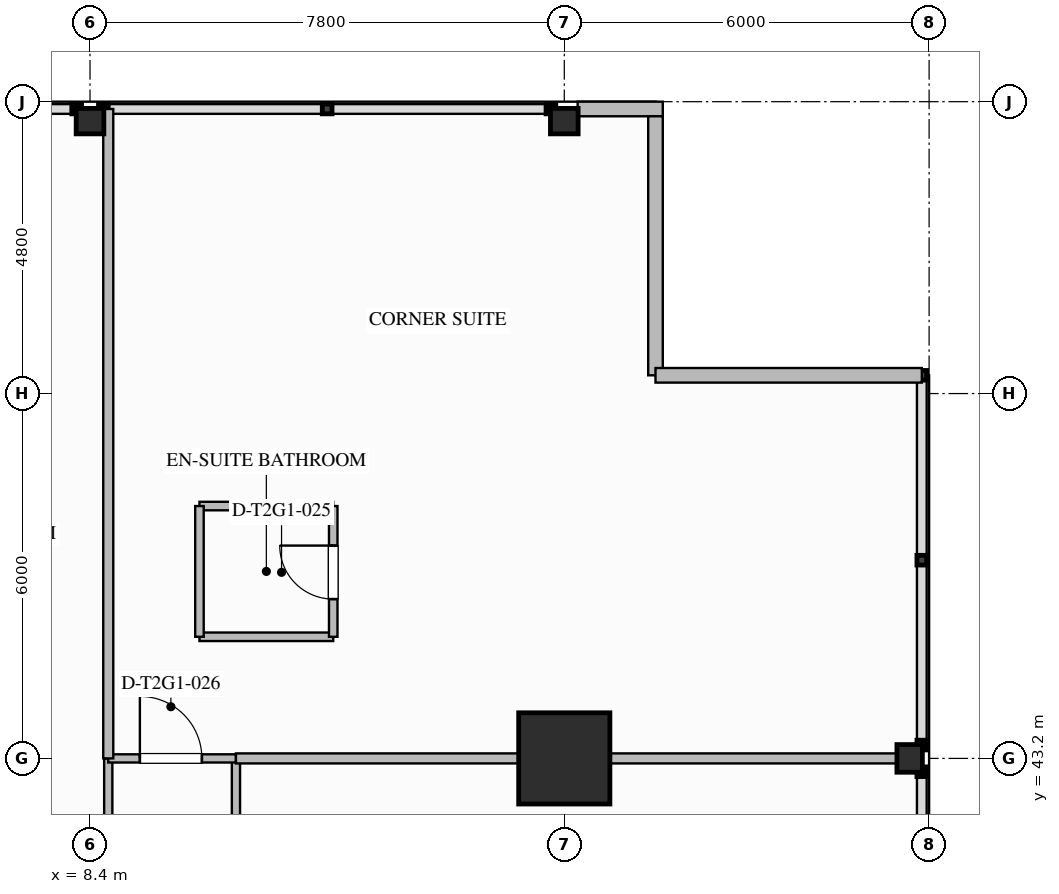
"""IFC4 building model, lengths in metres.
Left out: names, types, materials, properties, quantities, classifications, styles, units other than length and angle.
Written with IfcOpenShell. Run it as: python <this file> out.ifc"""

import sys

from ifc_helpers import new_model, si_unit, direction, frame, frame_2d, origin, origin_2d, place, context, subcontext, project, spatial, rectangle, i_section, extrude, element, fill, save


model = new_model("IFC4")
c1 = context("Model", 3, precision=1e-05, world=origin(), true_north=direction((0.0, 1.0)))
c2 = subcontext(c1, "Body", "Model", "MODEL_VIEW")
j1 = project(units=[si_unit("LENGTHUNIT", "METRE"), si_unit("PLANEANGLEUNIT", "RADIAN")], contexts=[c1])
p1 = place(None, origin())
s1 = spatial("IfcSite", under=j1, at=p1, CompositionType="ELEMENT")
p2 = place(p1, origin())
s2 = spatial("IfcBuilding", under=s1, at=p2, CompositionType="ELEMENT")
p3 = place(p2, frame((0.0, 0.0, 91.8)))
s3 = spatial("IfcBuildingStorey", under=s2, at=p3, CompositionType="ELEMENT", Elevation=91.8)
p4 = place(p3, frame((16.2, 43.2, 0.0), z_axis=(0.0, 0.0, 1.0), x_axis=(1.0, 0.0, 0.0)))
e1 = element("IfcColumn", 1, at=p4, inside=s3, PredefinedType="COLUMN", context=c2, shape_type="SweptSolid", body=[
    extrude(rectangle(XDim=1.5, YDim=1.5, at=origin_2d()), origin(), (0.0, 0.0, 1.0), 3.5),
])
for number, where, z_axis, x_axis in (
    (2, (21.88, 43.2, 0.0), (0.0, 0.0, 1.0), (1.0, 0.0, 0.0)),
    (3, (8.4, 53.68, 0.0), (0.0, 0.0, 1.0), (0.0, 1.0, 0.0)),
    (4, (16.2, 53.68, 0.0), (0.0, 0.0, 1.0), (0.0, 1.0, 0.0)),
):
    element("IfcColumn", number, at=place(p3, frame(where, z_axis=z_axis, x_axis=x_axis)), inside=s3, PredefinedType="COLUMN", context=c2, shape_type="SweptSolid", body=[
        extrude(i_section(OverallWidth=0.418, OverallDepth=0.455, WebThickness=0.042, FlangeThickness=0.068, FilletRadius=0.03, at=origin_2d()), origin(), (0.0, 0.0, 1.0), 3.497),
    ])
p5 = place(p3, frame((16.42, 53.88, 0.0), z_axis=(0.0, 0.0, 1.0), x_axis=(1.0, 0.0, 0.0)))
e5 = element("IfcWall", 5, at=p5, inside=s3, PredefinedType="STANDARD", context=c2, shape_type="SweptSolid", body=[
    extrude(rectangle(XDim=1.4, YDim=0.24, at=frame_2d((0.7, 0.0))), origin(), (0.0, 0.0, 1.0), 3.24),
])
p6 = place(p3, frame((17.7, 53.76, 0.0), z_axis=(0.0, 0.0, 1.0), x_axis=(0.0, -1.0, 0.0)))
e6 = element("IfcWall", 6, at=p6, inside=s3, PredefinedType="STANDARD", context=c2, shape_type="SweptSolid", body=[
    extrude(rectangle(XDim=4.26, YDim=0.24, at=frame_2d((2.13, 0.0))), origin(), (0.0, 0.0, 1.0), 3.24),
])
p7 = place(p3, frame((17.7, 49.5, 0.0), z_axis=(0.0, 0.0, 1.0), x_axis=(1.0, 0.0, 0.0)))
e7 = element("IfcWall", 7, at=p7, inside=s3, PredefinedType="STANDARD", context=c2, shape_type="SweptSolid", body=[
    extrude(rectangle(XDim=4.38, YDim=0.24, at=frame_2d((2.19, 0.0))), origin(), (0.0, 0.0, 1.0), 3.24),
])
p8 = place(p3, frame((8.7, 37.8, 0.0), z_axis=(0.0, 0.0, 1.0), x_axis=(0.0, 1.0, 0.0)))
e8 = element("IfcWall", 8, at=p8, inside=s3, PredefinedType="PARTITIONING", context=c2, shape_type="SweptSolid", body=[
    extrude(rectangle(XDim=5.4, YDim=0.135, at=frame_2d((2.7, 0.0))), origin(), (0.0, 0.0, 1.0), 3.24),
])
p9 = place(p3, frame((10.8, 10.8, 0.0), z_axis=(0.0, 0.0, 1.0), x_axis=(0.0, 1.0, 0.0)))
e9 = element("IfcWall", 9, at=p9, inside=s3, PredefinedType="PARTITIONING", context=c2, shape_type="SweptSolid", body=[
    extrude(rectangle(XDim=32.4, YDim=0.135, at=frame_2d((16.2, 0.0))), origin(), (0.0, 0.0, 1.0), 3.24),
])
p10 = place(p9, frame((2.785, 0.0, 0.0)))
e10 = element("IfcOpeningElement", 10, at=p10, cuts=e9, PredefinedType="OPENING", context=c2, shape_type="SweptSolid", body=[
    extrude(rectangle(XDim=0.96, YDim=2.15, at=frame_2d((0.48, 1.075))), frame((0.0, 0.077, 0.0), z_axis=(0.0, -1.0, 0.0), x_axis=(1.0, 0.0, 0.0)), (0.0, 0.0, 1.0), 0.155),
])
p11 = place(p9, frame((7.939, 0.0, 0.0)))
e11 = element("IfcOpeningElement", 11, at=p11, cuts=e9, PredefinedType="OPENING", context=c2, shape_type="SweptSolid", body=[
    extrude(rectangle(XDim=0.96, YDim=2.15, at=frame_2d((0.48, 1.075))), frame((0.0, 0.077, 0.0), z_axis=(0.0, -1.0, 0.0), x_axis=(1.0, 0.0, 0.0)), (0.0, 0.0, 1.0), 0.155),
])
p12 = place(p9, frame((13.99, 0.0, 0.0)))
e12 = element("IfcOpeningElement", 12, at=p12, cuts=e9, PredefinedType="OPENING", context=c2, shape_type="SweptSolid", body=[
    extrude(rectangle(XDim=0.96, YDim=2.15, at=frame_2d((0.48, 1.075))), frame((0.0, 0.077, 0.0), z_axis=(0.0, -1.0, 0.0), x_axis=(1.0, 0.0, 0.0)), (0.0, 0.0, 1.0), 0.155),
])
p13 = place(p9, frame((18.635, 0.0, 0.0)))
e13 = element("IfcOpeningElement", 13, at=p13, cuts=e9, PredefinedType="OPENING", context=c2, shape_type="SweptSolid", body=[
    extrude(rectangle(XDim=1.02, YDim=2.15, at=frame_2d((0.51, 1.075))), frame((0.0, 0.077, 0.0), z_axis=(0.0, -1.0, 0.0), x_axis=(1.0, 0.0, 0.0)), (0.0, 0.0, 1.0), 0.155),
])
p14 = place(p9, frame((25.281, 0.0, 0.0)))
e14 = element("IfcOpeningElement", 14, at=p14, cuts=e9, PredefinedType="OPENING", context=c2, shape_type="SweptSolid", body=[
    extrude(rectangle(XDim=0.96, YDim=2.15, at=frame_2d((0.48, 1.075))), frame((0.0, 0.077, 0.0), z_axis=(0.0, -1.0, 0.0), x_axis=(1.0, 0.0, 0.0)), (0.0, 0.0, 1.0), 0.155),
])
p15 = place(p9, frame((30.435, 0.0, 0.0)))
e15 = element("IfcOpeningElement", 15, at=p15, cuts=e9, PredefinedType="OPENING", context=c2, shape_type="SweptSolid", body=[
    extrude(rectangle(XDim=0.96, YDim=2.15, at=frame_2d((0.48, 1.075))), frame((0.0, 0.077, 0.0), z_axis=(0.0, -1.0, 0.0), x_axis=(1.0, 0.0, 0.0)), (0.0, 0.0, 1.0), 0.155),
])
p16 = place(p3, frame((8.7, 43.2, 0.0), z_axis=(0.0, 0.0, 1.0), x_axis=(1.0, 0.0, 0.0)))
e16 = element("IfcWall", 16, at=p16, inside=s3, PredefinedType="PARTITIONING", context=c2, shape_type="SweptSolid", body=[
    extrude(rectangle(XDim=2.1, YDim=0.135, at=frame_2d((1.05, 0.0))), origin(), (0.0, 0.0, 1.0), 2.452),
])
p17 = place(p16, frame((0.52, 0.0, 0.0)))
e17 = element("IfcOpeningElement", 17, at=p17, cuts=e16, PredefinedType="OPENING", context=c2, shape_type="SweptSolid", body=[
    extrude(rectangle(XDim=1.02, YDim=2.15, at=frame_2d((0.51, 1.075))), frame((0.0, 0.077, 0.0), z_axis=(0.0, -1.0, 0.0), x_axis=(1.0, 0.0, 0.0)), (0.0, 0.0, 1.0), 0.155),
])
p18 = place(p3, frame((8.7, 43.2, 0.0), z_axis=(0.0, 0.0, 1.0), x_axis=(0.0, 1.0, 0.0)))
e18 = element("IfcWall", 18, at=p18, inside=s3, PredefinedType="PARTITIONING", context=c2, shape_type="SweptSolid", body=[
    extrude(rectangle(XDim=10.68, YDim=0.165, at=frame_2d((5.34, 0.0))), origin(), (0.0, 0.0, 1.0), 2.452),
])
p19 = place(p3, frame((10.8, 43.2, 0.0), z_axis=(0.0, 0.0, 1.0), x_axis=(1.0, 0.0, 0.0)))
e19 = element("IfcWall", 19, at=p19, inside=s3, PredefinedType="PARTITIONING", context=c2, shape_type="SweptSolid", body=[
    extrude(rectangle(XDim=11.28, YDim=0.165, at=frame_2d((5.64, 0.0))), origin(), (0.0, 0.0, 1.0), 2.452),
])
for number, where, z_axis, x_axis in (
    (20, (10.2, 45.2, 0.0), (0.0, 0.0, 1.0), (1.0, 0.0, 0.0)),
    (21, (10.2, 47.35, 0.0), (0.0, 0.0, 1.0), (1.0, 0.0, 0.0)),
):
    element("IfcWall", number, at=place(p3, frame(where, z_axis=z_axis, x_axis=x_axis)), inside=s3, PredefinedType="PLUMBINGWALL", context=c2, shape_type="SweptSolid", body=[
        extrude(rectangle(XDim=2.2, YDim=0.14, at=frame_2d((1.1, 0.0))), origin(), (0.0, 0.0, 1.0), 3.24),
    ])
p20 = place(p3, frame((10.2, 45.2, 0.0), z_axis=(0.0, 0.0, 1.0), x_axis=(0.0, 1.0, 0.0)))
e22 = element("IfcWall", 22, at=p20, inside=s3, PredefinedType="PLUMBINGWALL", context=c2, shape_type="SweptSolid", body=[
    extrude(rectangle(XDim=2.15, YDim=0.14, at=frame_2d((1.075, 0.0))), origin(), (0.0, 0.0, 1.0), 3.24),
])
p21 = place(p3, frame((12.4, 45.2, 0.0), z_axis=(0.0, 0.0, 1.0), x_axis=(0.0, 1.0, 0.0)))
e23 = element("IfcWall", 23, at=p21, inside=s3, PredefinedType="PLUMBINGWALL", context=c2, shape_type="SweptSolid", body=[
    extrude(rectangle(XDim=2.15, YDim=0.14, at=frame_2d((1.075, 0.0))), origin(), (0.0, 0.0, 1.0), 3.24),
])
p22 = place(p21, frame((0.62, 0.0, 0.0)))
e24 = element("IfcOpeningElement", 24, at=p22, cuts=e23, PredefinedType="OPENING", context=c2, shape_type="SweptSolid", body=[
    extrude(rectangle(XDim=0.88, YDim=2.1, at=frame_2d((0.44, 1.05))), frame((0.0, 0.08, 0.0), z_axis=(0.0, -1.0, 0.0), x_axis=(1.0, 0.0, 0.0)), (0.0, 0.0, 1.0), 0.16),
])
p23 = place(p22, origin())
e25 = element("IfcDoor", 25, at=p23, inside=s3, OperationType="SINGLE_SWING_RIGHT", PredefinedType="DOOR", context=c2, shape_type="SweptSolid", body=[
    extrude(rectangle(XDim=0.88, YDim=2.1, at=frame_2d((0.44, 1.05))), frame((0.0, 0.025, 0.0), z_axis=(0.0, -1.0, 0.0), x_axis=(1.0, 0.0, 0.0)), (0.0, 0.0, 1.0), 0.05),
])
fill(e24, e25)
p24 = place(p17, origin())
e26 = element("IfcDoor", 26, at=p24, inside=s3, OperationType="SINGLE_SWING_LEFT", PredefinedType="DOOR", context=c2, shape_type="SweptSolid", body=[
    extrude(rectangle(XDim=1.02, YDim=2.15, at=frame_2d((0.51, 1.075))), frame((0.0, 0.025, 0.0), z_axis=(0.0, -1.0, 0.0), x_axis=(1.0, 0.0, 0.0)), (0.0, 0.0, 1.0), 0.05),
])
fill(e17, e26)
save(model, sys.argv[1])
